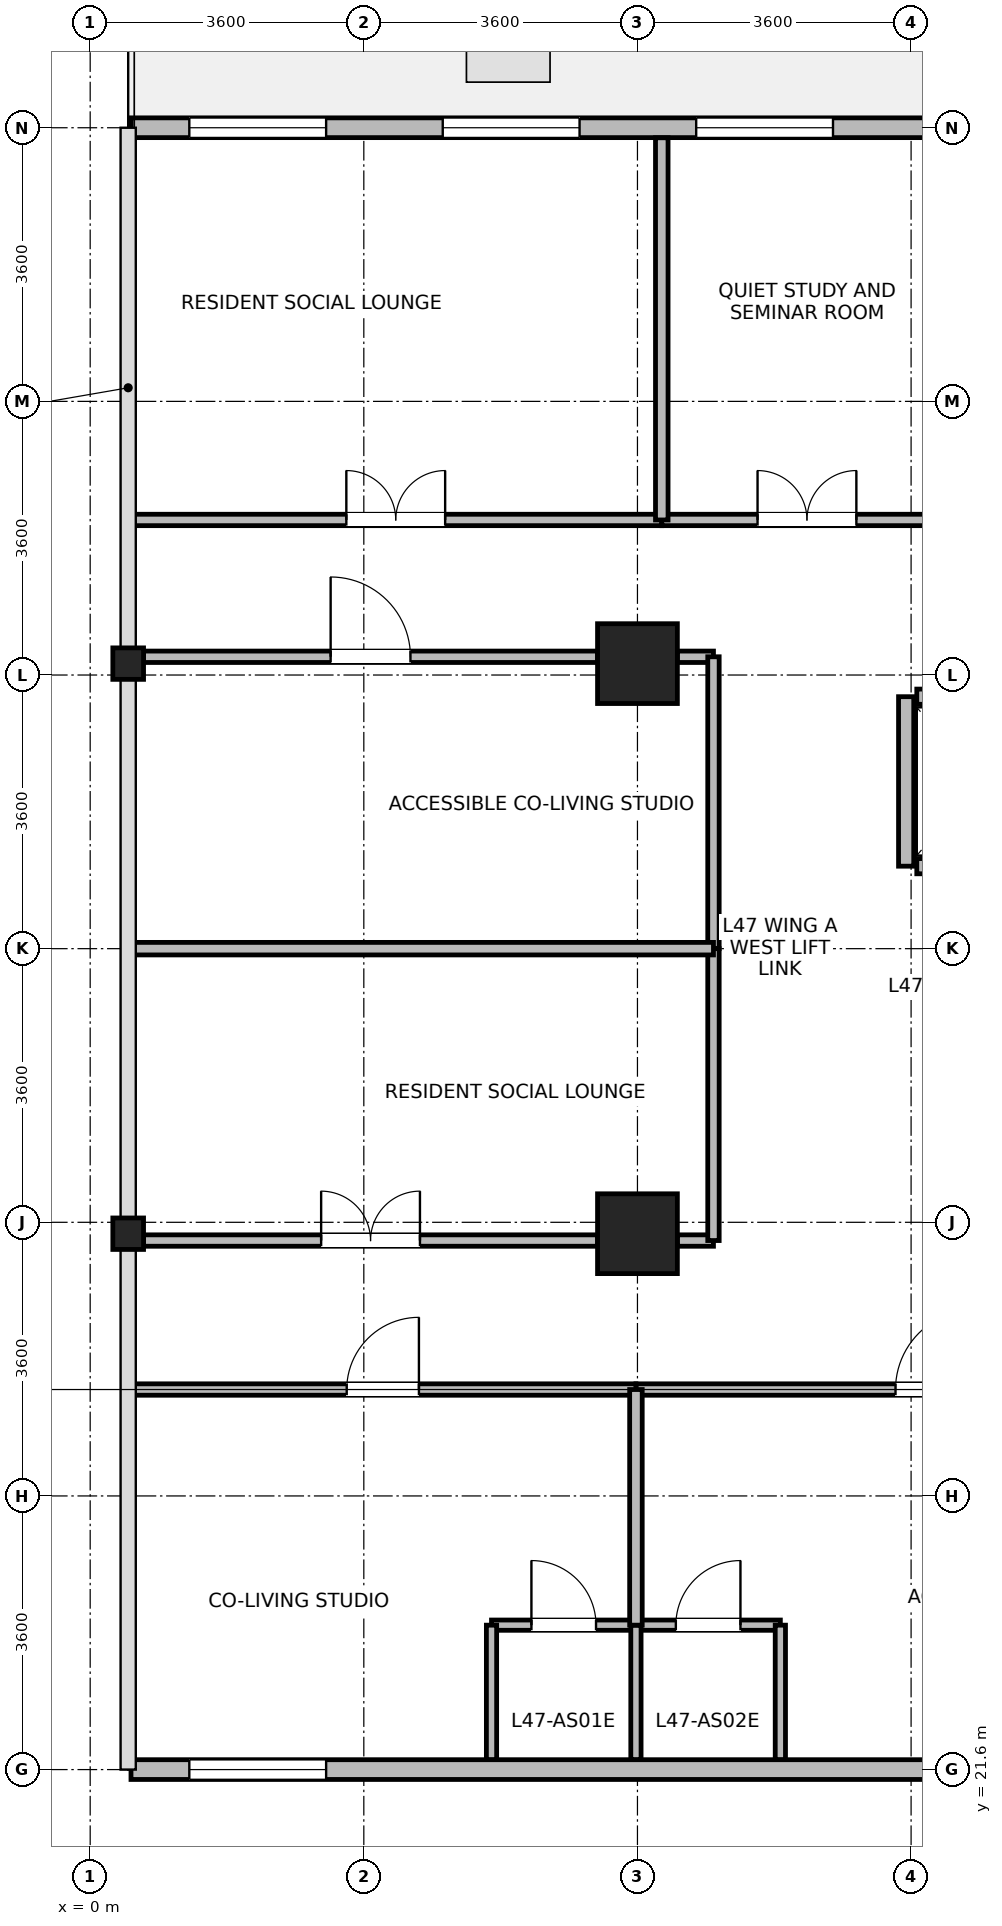
"""IFC4 building model, lengths in metres.
Left out: names, types, materials, properties, quantities, classifications, styles, units other than length and angle.
Written with IfcOpenShell. Run it as: python <this file> out.ifc"""

import sys

from ifc_helpers import new_model, si_unit, direction, frame, frame_2d, origin, origin_2d, place, context, subcontext, project, spatial, rectangle, i_section, extrude, source, transform, mapped, element, fill, save


model = new_model("IFC4")
c1 = context("Model", 3, precision=1e-05, world=origin(), true_north=direction((0.0, 1.0)))
c2 = subcontext(c1, "Body", "Model", "MODEL_VIEW")
j1 = project(units=[si_unit("LENGTHUNIT", "METRE"), si_unit("PLANEANGLEUNIT", "RADIAN")], contexts=[c1])
p1 = place(None, origin())
s1 = spatial("IfcSite", under=j1, at=p1, CompositionType="ELEMENT")
p2 = place(p1, origin())
s2 = spatial("IfcBuilding", under=s1, at=p2, CompositionType="ELEMENT")
p3 = place(p2, frame((0.0, 0.0, 184.6)))
s3 = spatial("IfcBuildingStorey", under=s2, at=p3, CompositionType="ELEMENT", Elevation=184.6)
m1 = source(origin(), c2, "Body", "SweptSolid", [
    extrude(rectangle(XDim=1.05, YDim=1.05, at=origin_2d()), origin(), (0.0, 0.0, 1.0), 3.7),
])
for number, where, z_axis, x_axis in (
    (1, (7.2, 28.65, 0.0), (0.0, 0.0, 1.0), (1.0, 0.0, 0.0)),
    (2, (7.2, 36.15, 0.0), (0.0, 0.0, 1.0), (1.0, 0.0, 0.0)),
):
    element("IfcColumn", number, at=place(p3, frame(where, z_axis=z_axis, x_axis=x_axis)), inside=s3, PredefinedType="COLUMN", context=c2, shape_type="MappedRepresentation", body=[
        mapped(m1, transform((0.0, 0.0, 0.0), x_axis=(1.0, 0.0, 0.0), y_axis=(0.0, 1.0, 0.0), z_axis=(0.0, 0.0, 1.0), scale=1.0)),
    ])
m2 = source(origin(), c2, "Body", "SweptSolid", [
    extrude(i_section(OverallWidth=0.404, OverallDepth=0.414, WebThickness=0.021, FlangeThickness=0.028, FilletRadius=0.015, at=origin_2d()), origin(), (0.0, 0.0, 1.0), 3.7),
])
for number, where, z_axis, x_axis in (
    (3, (0.5, 28.65, 0.0), (0.0, 0.0, 1.0), (1.0, 0.0, 0.0)),
    (4, (0.5, 36.15, 0.0), (0.0, 0.0, 1.0), (1.0, 0.0, 0.0)),
):
    element("IfcColumn", number, at=place(p3, frame(where, z_axis=z_axis, x_axis=x_axis)), inside=s3, PredefinedType="COLUMN", context=c2, shape_type="MappedRepresentation", body=[
        mapped(m2, transform((0.0, 0.0, 0.0), x_axis=(1.0, 0.0, 0.0), y_axis=(0.0, 1.0, 0.0), z_axis=(0.0, 0.0, 1.0), scale=1.0)),
    ])
p4 = place(p3, frame((0.537, 43.2, 0.0), z_axis=(0.0, 0.0, 1.0), x_axis=(1.0, 0.0, 0.0)))
e5 = element("IfcWall", 5, at=p4, inside=s3, PredefinedType="STANDARD", context=c2, shape_type="SweptSolid", body=[
    extrude(rectangle(XDim=13.337, YDim=0.26, at=frame_2d((6.668, 0.0))), origin(), (0.0, 0.0, 1.0), 3.44),
])
p5 = place(p4, frame((0.767, 0.0, 0.85)))
e6 = element("IfcOpeningElement", 6, at=p5, cuts=e5, PredefinedType="OPENING", context=c2, shape_type="SweptSolid", body=[
    extrude(rectangle(XDim=1.8, YDim=1.85, at=frame_2d((0.9, 0.925))), frame((0.0, 0.14, 0.0), z_axis=(0.0, -1.0, 0.0), x_axis=(1.0, 0.0, 0.0)), (0.0, 0.0, 1.0), 0.28),
])
p6 = place(p4, frame((4.101, 0.0, 0.85)))
e7 = element("IfcOpeningElement", 7, at=p6, cuts=e5, PredefinedType="OPENING", context=c2, shape_type="SweptSolid", body=[
    extrude(rectangle(XDim=1.8, YDim=1.85, at=frame_2d((0.9, 0.925))), frame((0.0, 0.14, 0.0), z_axis=(0.0, -1.0, 0.0), x_axis=(1.0, 0.0, 0.0)), (0.0, 0.0, 1.0), 0.28),
])
p7 = place(p4, frame((7.436, 0.0, 0.85)))
e8 = element("IfcOpeningElement", 8, at=p7, cuts=e5, PredefinedType="OPENING", context=c2, shape_type="SweptSolid", body=[
    extrude(rectangle(XDim=1.8, YDim=1.85, at=frame_2d((0.9, 0.925))), frame((0.0, 0.14, 0.0), z_axis=(0.0, -1.0, 0.0), x_axis=(1.0, 0.0, 0.0)), (0.0, 0.0, 1.0), 0.28),
])
p8 = place(p3, frame((13.874, 21.6, 0.0), z_axis=(0.0, 0.0, 1.0), x_axis=(-1.0, 0.0, 0.0)))
e9 = element("IfcWall", 9, at=p8, inside=s3, PredefinedType="STANDARD", context=c2, shape_type="SweptSolid", body=[
    extrude(rectangle(XDim=13.337, YDim=0.26, at=frame_2d((6.668, 0.0))), origin(), (0.0, 0.0, 1.0), 3.44),
])
p9 = place(p8, frame((0.767, 0.0, 0.85)))
e10 = element("IfcOpeningElement", 10, at=p9, cuts=e9, PredefinedType="OPENING", context=c2, shape_type="SweptSolid", body=[
    extrude(rectangle(XDim=1.8, YDim=1.85, at=frame_2d((0.9, 0.925))), frame((0.0, 0.14, 0.0), z_axis=(0.0, -1.0, 0.0), x_axis=(1.0, 0.0, 0.0)), (0.0, 0.0, 1.0), 0.28),
])
p10 = place(p8, frame((10.77, 0.0, 0.85)))
e11 = element("IfcOpeningElement", 11, at=p10, cuts=e9, PredefinedType="OPENING", context=c2, shape_type="SweptSolid", body=[
    extrude(rectangle(XDim=1.8, YDim=1.85, at=frame_2d((0.9, 0.925))), frame((0.0, 0.14, 0.0), z_axis=(0.0, -1.0, 0.0), x_axis=(1.0, 0.0, 0.0)), (0.0, 0.0, 1.0), 0.28),
])
p11 = place(p3, frame((10.875, 33.485, 0.0), z_axis=(0.0, 0.0, 1.0), x_axis=(1.0, 0.0, 0.0)))
e12 = element("IfcWall", 12, at=p11, inside=s3, PredefinedType="PARTITIONING", context=c2, shape_type="SweptSolid", body=[
    extrude(rectangle(XDim=1.65, YDim=0.2, at=frame_2d((0.825, 0.0))), origin(), (0.0, 0.0, 1.0), 3.44),
])
p12 = place(p11, frame((0.275, 0.0, 0.0)))
e13 = element("IfcOpeningElement", 13, at=p12, cuts=e12, PredefinedType="OPENING", context=c2, shape_type="SweptSolid", body=[
    extrude(rectangle(XDim=1.1, YDim=2.12, at=frame_2d((0.55, 1.06))), frame((0.0, 0.11, 0.0), z_axis=(0.0, -1.0, 0.0), x_axis=(1.0, 0.0, 0.0)), (0.0, 0.0, 1.0), 0.22),
])
p13 = place(p3, frame((10.875, 35.715, 0.0), z_axis=(0.0, 0.0, 1.0), x_axis=(1.0, 0.0, 0.0)))
e14 = element("IfcWall", 14, at=p13, inside=s3, PredefinedType="PARTITIONING", context=c2, shape_type="SweptSolid", body=[
    extrude(rectangle(XDim=1.65, YDim=0.2, at=frame_2d((0.825, 0.0))), origin(), (0.0, 0.0, 1.0), 3.44),
])
p14 = place(p3, frame((10.735, 33.485, 0.0), z_axis=(0.0, 0.0, 1.0), x_axis=(0.0, 1.0, 0.0)))
e15 = element("IfcWall", 15, at=p14, inside=s3, PredefinedType="PARTITIONING", context=c2, shape_type="SweptSolid", body=[
    extrude(rectangle(XDim=2.23, YDim=0.2, at=frame_2d((1.115, 0.0))), origin(), (0.0, 0.0, 1.0), 3.44),
])
p15 = place(p3, frame((7.18, 23.5, 0.0), z_axis=(0.0, 0.0, 1.0), x_axis=(1.0, 0.0, 0.0)))
e16 = element("IfcWall", 16, at=p15, inside=s3, PredefinedType="PARTITIONING", context=c2, shape_type="SweptSolid", body=[
    extrude(rectangle(XDim=1.9, YDim=0.135, at=frame_2d((0.95, 0.0))), origin(), (0.0, 0.0, 1.0), 3.44),
])
p16 = place(p15, frame((0.525, 0.0, 0.0)))
e17 = element("IfcOpeningElement", 17, at=p16, cuts=e16, PredefinedType="OPENING", context=c2, shape_type="SweptSolid", body=[
    extrude(rectangle(XDim=0.85, YDim=2.04, at=frame_2d((0.425, 1.02))), frame((0.0, 0.078, 0.0), z_axis=(0.0, -1.0, 0.0), x_axis=(1.0, 0.0, 0.0)), (0.0, 0.0, 1.0), 0.155),
])
p17 = place(p3, frame((5.28, 23.5, 0.0), z_axis=(0.0, 0.0, 1.0), x_axis=(1.0, 0.0, 0.0)))
e18 = element("IfcWall", 18, at=p17, inside=s3, PredefinedType="PARTITIONING", context=c2, shape_type="SweptSolid", body=[
    extrude(rectangle(XDim=1.9, YDim=0.135, at=frame_2d((0.95, 0.0))), origin(), (0.0, 0.0, 1.0), 3.44),
])
p18 = place(p17, frame((0.525, 0.0, 0.0)))
e19 = element("IfcOpeningElement", 19, at=p18, cuts=e18, PredefinedType="OPENING", context=c2, shape_type="SweptSolid", body=[
    extrude(rectangle(XDim=0.85, YDim=2.04, at=frame_2d((0.425, 1.02))), frame((0.0, 0.078, 0.0), z_axis=(0.0, -1.0, 0.0), x_axis=(1.0, 0.0, 0.0)), (0.0, 0.0, 1.0), 0.155),
])
for number, where, z_axis, x_axis in (
    (20, (5.28, 21.732, 0.0), (0.0, 0.0, 1.0), (0.0, 1.0, 0.0)),
    (21, (7.18, 21.732, 0.0), (0.0, 0.0, 1.0), (0.0, 1.0, 0.0)),
    (22, (9.08, 21.732, 0.0), (0.0, 0.0, 1.0), (0.0, 1.0, 0.0)),
):
    element("IfcWall", number, at=place(p3, frame(where, z_axis=z_axis, x_axis=x_axis)), inside=s3, PredefinedType="PARTITIONING", context=c2, shape_type="SweptSolid", body=[
        extrude(rectangle(XDim=1.768, YDim=0.135, at=frame_2d((0.884, 0.0))), origin(), (0.0, 0.0, 1.0), 3.44),
    ])
p19 = place(p3, frame((7.18, 26.6, 0.0), z_axis=(0.0, 0.0, 1.0), x_axis=(1.0, 0.0, 0.0)))
e23 = element("IfcWall", 23, at=p19, inside=s3, PredefinedType="PARTITIONING", context=c2, shape_type="SweptSolid", body=[
    extrude(rectangle(XDim=7.88, YDim=0.15, at=frame_2d((3.94, 0.0))), origin(), (0.0, 0.0, 1.0), 3.44),
])
p20 = place(p19, frame((3.415, 0.0, 0.0)))
e24 = element("IfcOpeningElement", 24, at=p20, cuts=e23, PredefinedType="OPENING", context=c2, shape_type="SweptSolid", body=[
    extrude(rectangle(XDim=1.05, YDim=2.12, at=frame_2d((0.525, 1.06))), frame((0.0, 0.085, 0.0), z_axis=(0.0, -1.0, 0.0), x_axis=(1.0, 0.0, 0.0)), (0.0, 0.0, 1.0), 0.17),
])
p21 = place(p3, frame((0.702, 28.56, 0.0), z_axis=(0.0, 0.0, 1.0), x_axis=(1.0, 0.0, 0.0)))
e25 = element("IfcWall", 25, at=p21, inside=s3, PredefinedType="PARTITIONING", context=c2, shape_type="SweptSolid", body=[
    extrude(rectangle(XDim=5.973, YDim=0.15, at=frame_2d((2.987, 0.0))), origin(), (0.0, 0.0, 1.0), 2.84),
])
p22 = place(p21, frame((2.336, 0.0, 0.0)))
e26 = element("IfcOpeningElement", 26, at=p22, cuts=e25, PredefinedType="OPENING", context=c2, shape_type="SweptSolid", body=[
    extrude(rectangle(XDim=1.3, YDim=2.12, at=frame_2d((0.65, 1.06))), frame((0.0, 0.085, 0.0), z_axis=(0.0, -1.0, 0.0), x_axis=(1.0, 0.0, 0.0)), (0.0, 0.0, 1.0), 0.17),
])
p23 = place(p3, frame((7.725, 28.56, 0.0), z_axis=(0.0, 0.0, 1.0), x_axis=(1.0, 0.0, 0.0)))
e27 = element("IfcWall", 27, at=p23, inside=s3, PredefinedType="PARTITIONING", context=c2, shape_type="SweptSolid", body=[
    extrude(rectangle(XDim=0.475, YDim=0.15, at=frame_2d((0.237, 0.0))), origin(), (0.0, 0.0, 1.0), 2.84),
])
p24 = place(p3, frame((0.702, 36.24, 0.0), z_axis=(0.0, 0.0, 1.0), x_axis=(1.0, 0.0, 0.0)))
e28 = element("IfcWall", 28, at=p24, inside=s3, PredefinedType="PARTITIONING", context=c2, shape_type="SweptSolid", body=[
    extrude(rectangle(XDim=5.973, YDim=0.15, at=frame_2d((2.987, 0.0))), origin(), (0.0, 0.0, 1.0), 2.84),
])
p25 = place(p24, frame((2.461, 0.0, 0.0)))
e29 = element("IfcOpeningElement", 29, at=p25, cuts=e28, PredefinedType="OPENING", context=c2, shape_type="SweptSolid", body=[
    extrude(rectangle(XDim=1.05, YDim=2.12, at=frame_2d((0.525, 1.06))), frame((0.0, 0.085, 0.0), z_axis=(0.0, -1.0, 0.0), x_axis=(1.0, 0.0, 0.0)), (0.0, 0.0, 1.0), 0.17),
])
p26 = place(p3, frame((7.725, 36.24, 0.0), z_axis=(0.0, 0.0, 1.0), x_axis=(1.0, 0.0, 0.0)))
e30 = element("IfcWall", 30, at=p26, inside=s3, PredefinedType="PARTITIONING", context=c2, shape_type="SweptSolid", body=[
    extrude(rectangle(XDim=0.475, YDim=0.15, at=frame_2d((0.237, 0.0))), origin(), (0.0, 0.0, 1.0), 2.84),
])
p27 = place(p3, frame((0.52, 38.04, 0.0), z_axis=(0.0, 0.0, 1.0), x_axis=(1.0, 0.0, 0.0)))
e31 = element("IfcWall", 31, at=p27, inside=s3, PredefinedType="PARTITIONING", context=c2, shape_type="SweptSolid", body=[
    extrude(rectangle(XDim=7.0, YDim=0.15, at=frame_2d((3.5, 0.0))), origin(), (0.0, 0.0, 1.0), 3.44),
])
p28 = place(p27, frame((2.85, 0.0, 0.0)))
e32 = element("IfcOpeningElement", 32, at=p28, cuts=e31, PredefinedType="OPENING", context=c2, shape_type="SweptSolid", body=[
    extrude(rectangle(XDim=1.3, YDim=2.12, at=frame_2d((0.65, 1.06))), frame((0.0, 0.085, 0.0), z_axis=(0.0, -1.0, 0.0), x_axis=(1.0, 0.0, 0.0)), (0.0, 0.0, 1.0), 0.17),
])
p29 = place(p3, frame((0.52, 26.6, 0.0), z_axis=(0.0, 0.0, 1.0), x_axis=(1.0, 0.0, 0.0)))
e33 = element("IfcWall", 33, at=p29, inside=s3, PredefinedType="PARTITIONING", context=c2, shape_type="SweptSolid", body=[
    extrude(rectangle(XDim=6.66, YDim=0.15, at=frame_2d((3.33, 0.0))), origin(), (0.0, 0.0, 1.0), 3.44),
])
p30 = place(p29, frame((2.855, 0.0, 0.0)))
e34 = element("IfcOpeningElement", 34, at=p30, cuts=e33, PredefinedType="OPENING", context=c2, shape_type="SweptSolid", body=[
    extrude(rectangle(XDim=0.95, YDim=2.1, at=frame_2d((0.475, 1.05))), frame((0.0, 0.085, 0.0), z_axis=(0.0, -1.0, 0.0), x_axis=(1.0, 0.0, 0.0)), (0.0, 0.0, 1.0), 0.17),
])
p31 = place(p3, frame((8.2, 32.4, 0.0), z_axis=(0.0, 0.0, 1.0), x_axis=(0.0, 1.0, 0.0)))
e35 = element("IfcWall", 35, at=p31, inside=s3, PredefinedType="PARTITIONING", context=c2, shape_type="SweptSolid", body=[
    extrude(rectangle(XDim=3.84, YDim=0.15, at=frame_2d((1.92, 0.0))), origin(), (0.0, 0.0, 1.0), 3.44),
])
p32 = place(p3, frame((8.2, 28.56, 0.0), z_axis=(0.0, 0.0, 1.0), x_axis=(0.0, 1.0, 0.0)))
e36 = element("IfcWall", 36, at=p32, inside=s3, PredefinedType="PARTITIONING", context=c2, shape_type="SweptSolid", body=[
    extrude(rectangle(XDim=3.84, YDim=0.15, at=frame_2d((1.92, 0.0))), origin(), (0.0, 0.0, 1.0), 3.44),
])
p33 = place(p3, frame((7.52, 38.04, 0.0), z_axis=(0.0, 0.0, 1.0), x_axis=(1.0, 0.0, 0.0)))
e37 = element("IfcWall", 37, at=p33, inside=s3, PredefinedType="PARTITIONING", context=c2, shape_type="SweptSolid", body=[
    extrude(rectangle(XDim=3.82, YDim=0.15, at=frame_2d((1.91, 0.0))), origin(), (0.0, 0.0, 1.0), 3.44),
])
p34 = place(p33, frame((1.26, 0.0, 0.0)))
e38 = element("IfcOpeningElement", 38, at=p34, cuts=e37, PredefinedType="OPENING", context=c2, shape_type="SweptSolid", body=[
    extrude(rectangle(XDim=1.3, YDim=2.12, at=frame_2d((0.65, 1.06))), frame((0.0, 0.085, 0.0), z_axis=(0.0, -1.0, 0.0), x_axis=(1.0, 0.0, 0.0)), (0.0, 0.0, 1.0), 0.17),
])
p35 = place(p3, frame((0.52, 32.4, 0.0), z_axis=(0.0, 0.0, 1.0), x_axis=(1.0, 0.0, 0.0)))
e39 = element("IfcWall", 39, at=p35, inside=s3, PredefinedType="PARTITIONING", context=c2, shape_type="SweptSolid", body=[
    extrude(rectangle(XDim=7.68, YDim=0.165, at=frame_2d((3.84, 0.0))), origin(), (0.0, 0.0, 1.0), 3.44),
])
p36 = place(p3, frame((7.52, 38.04, 0.0), z_axis=(0.0, 0.0, 1.0), x_axis=(0.0, 1.0, 0.0)))
e40 = element("IfcWall", 40, at=p36, inside=s3, PredefinedType="PARTITIONING", context=c2, shape_type="SweptSolid", body=[
    extrude(rectangle(XDim=5.028, YDim=0.165, at=frame_2d((2.514, 0.0))), origin(), (0.0, 0.0, 1.0), 3.44),
])
p37 = place(p3, frame((7.18, 23.5, 0.0), z_axis=(0.0, 0.0, 1.0), x_axis=(0.0, 1.0, 0.0)))
e41 = element("IfcWall", 41, at=p37, inside=s3, PredefinedType="PARTITIONING", context=c2, shape_type="SweptSolid", body=[
    extrude(rectangle(XDim=3.1, YDim=0.165, at=frame_2d((1.55, 0.0))), origin(), (0.0, 0.0, 1.0), 3.44),
])
p38 = place(p5, origin())
e42 = element("IfcWindow", 42, at=p38, inside=s3, PartitioningType="SINGLE_PANEL", PredefinedType="WINDOW", context=c2, shape_type="SweptSolid", body=[
    extrude(rectangle(XDim=1.8, YDim=1.85, at=frame_2d((0.9, 0.925))), frame((0.0, 0.03, 0.0), z_axis=(0.0, -1.0, 0.0), x_axis=(1.0, 0.0, 0.0)), (0.0, 0.0, 1.0), 0.06),
])
fill(e6, e42)
p39 = place(p6, origin())
e43 = element("IfcWindow", 43, at=p39, inside=s3, PartitioningType="SINGLE_PANEL", PredefinedType="WINDOW", context=c2, shape_type="SweptSolid", body=[
    extrude(rectangle(XDim=1.8, YDim=1.85, at=frame_2d((0.9, 0.925))), frame((0.0, 0.03, 0.0), z_axis=(0.0, -1.0, 0.0), x_axis=(1.0, 0.0, 0.0)), (0.0, 0.0, 1.0), 0.06),
])
fill(e7, e43)
p40 = place(p7, origin())
e44 = element("IfcWindow", 44, at=p40, inside=s3, PartitioningType="SINGLE_PANEL", PredefinedType="WINDOW", context=c2, shape_type="SweptSolid", body=[
    extrude(rectangle(XDim=1.8, YDim=1.85, at=frame_2d((0.9, 0.925))), frame((0.0, 0.03, 0.0), z_axis=(0.0, -1.0, 0.0), x_axis=(1.0, 0.0, 0.0)), (0.0, 0.0, 1.0), 0.06),
])
fill(e8, e44)
p41 = place(p10, origin())
e45 = element("IfcWindow", 45, at=p41, inside=s3, PartitioningType="SINGLE_PANEL", PredefinedType="WINDOW", context=c2, shape_type="SweptSolid", body=[
    extrude(rectangle(XDim=1.8, YDim=1.85, at=frame_2d((0.9, 0.925))), frame((0.0, 0.03, 0.0), z_axis=(0.0, -1.0, 0.0), x_axis=(1.0, 0.0, 0.0)), (0.0, 0.0, 1.0), 0.06),
])
fill(e11, e45)
p42 = place(p16, origin())
e46 = element("IfcDoor", 46, at=p42, inside=s3, OperationType="SINGLE_SWING_RIGHT", PredefinedType="DOOR", context=c2, shape_type="SweptSolid", body=[
    extrude(rectangle(XDim=0.85, YDim=2.04, at=frame_2d((0.425, 1.02))), frame((0.0, 0.025, 0.0), z_axis=(0.0, -1.0, 0.0), x_axis=(1.0, 0.0, 0.0)), (0.0, 0.0, 1.0), 0.05),
])
fill(e17, e46)
p43 = place(p18, origin())
e47 = element("IfcDoor", 47, at=p43, inside=s3, OperationType="SINGLE_SWING_LEFT", PredefinedType="DOOR", context=c2, shape_type="SweptSolid", body=[
    extrude(rectangle(XDim=0.85, YDim=2.04, at=frame_2d((0.425, 1.02))), frame((0.0, 0.025, 0.0), z_axis=(0.0, -1.0, 0.0), x_axis=(1.0, 0.0, 0.0)), (0.0, 0.0, 1.0), 0.05),
])
fill(e19, e47)
p44 = place(p20, origin())
e48 = element("IfcDoor", 48, at=p44, inside=s3, OperationType="SINGLE_SWING_RIGHT", PredefinedType="DOOR", context=c2, shape_type="SweptSolid", body=[
    extrude(rectangle(XDim=1.05, YDim=2.12, at=frame_2d((0.525, 1.06))), frame((0.0, 0.025, 0.0), z_axis=(0.0, -1.0, 0.0), x_axis=(1.0, 0.0, 0.0)), (0.0, 0.0, 1.0), 0.05),
])
fill(e24, e48)
p45 = place(p22, origin())
e49 = element("IfcDoor", 49, at=p45, inside=s3, OperationType="DOUBLE_DOOR_SINGLE_SWING", PredefinedType="DOOR", context=c2, shape_type="SweptSolid", body=[
    extrude(rectangle(XDim=1.3, YDim=2.12, at=frame_2d((0.65, 1.06))), frame((0.0, 0.025, 0.0), z_axis=(0.0, -1.0, 0.0), x_axis=(1.0, 0.0, 0.0)), (0.0, 0.0, 1.0), 0.05),
])
fill(e26, e49)
p46 = place(p25, origin())
e50 = element("IfcDoor", 50, at=p46, inside=s3, OperationType="SINGLE_SWING_LEFT", PredefinedType="DOOR", context=c2, shape_type="SweptSolid", body=[
    extrude(rectangle(XDim=1.05, YDim=2.12, at=frame_2d((0.525, 1.06))), frame((0.0, 0.025, 0.0), z_axis=(0.0, -1.0, 0.0), x_axis=(1.0, 0.0, 0.0)), (0.0, 0.0, 1.0), 0.05),
])
fill(e29, e50)
p47 = place(p28, origin())
e51 = element("IfcDoor", 51, at=p47, inside=s3, OperationType="DOUBLE_DOOR_SINGLE_SWING", PredefinedType="DOOR", context=c2, shape_type="SweptSolid", body=[
    extrude(rectangle(XDim=1.3, YDim=2.12, at=frame_2d((0.65, 1.06))), frame((0.0, 0.025, 0.0), z_axis=(0.0, -1.0, 0.0), x_axis=(1.0, 0.0, 0.0)), (0.0, 0.0, 1.0), 0.05),
])
fill(e32, e51)
p48 = place(p30, origin())
e52 = element("IfcDoor", 52, at=p48, inside=s3, OperationType="SINGLE_SWING_RIGHT", PredefinedType="DOOR", context=c2, shape_type="SweptSolid", body=[
    extrude(rectangle(XDim=0.95, YDim=2.1, at=frame_2d((0.475, 1.05))), frame((0.0, 0.025, 0.0), z_axis=(0.0, -1.0, 0.0), x_axis=(1.0, 0.0, 0.0)), (0.0, 0.0, 1.0), 0.05),
])
fill(e34, e52)
p49 = place(p34, origin())
e53 = element("IfcDoor", 53, at=p49, inside=s3, OperationType="DOUBLE_DOOR_SINGLE_SWING", PredefinedType="DOOR", context=c2, shape_type="SweptSolid", body=[
    extrude(rectangle(XDim=1.3, YDim=2.12, at=frame_2d((0.65, 1.06))), frame((0.0, 0.025, 0.0), z_axis=(0.0, -1.0, 0.0), x_axis=(1.0, 0.0, 0.0)), (0.0, 0.0, 1.0), 0.05),
])
fill(e38, e53)
save(model, sys.argv[1])
